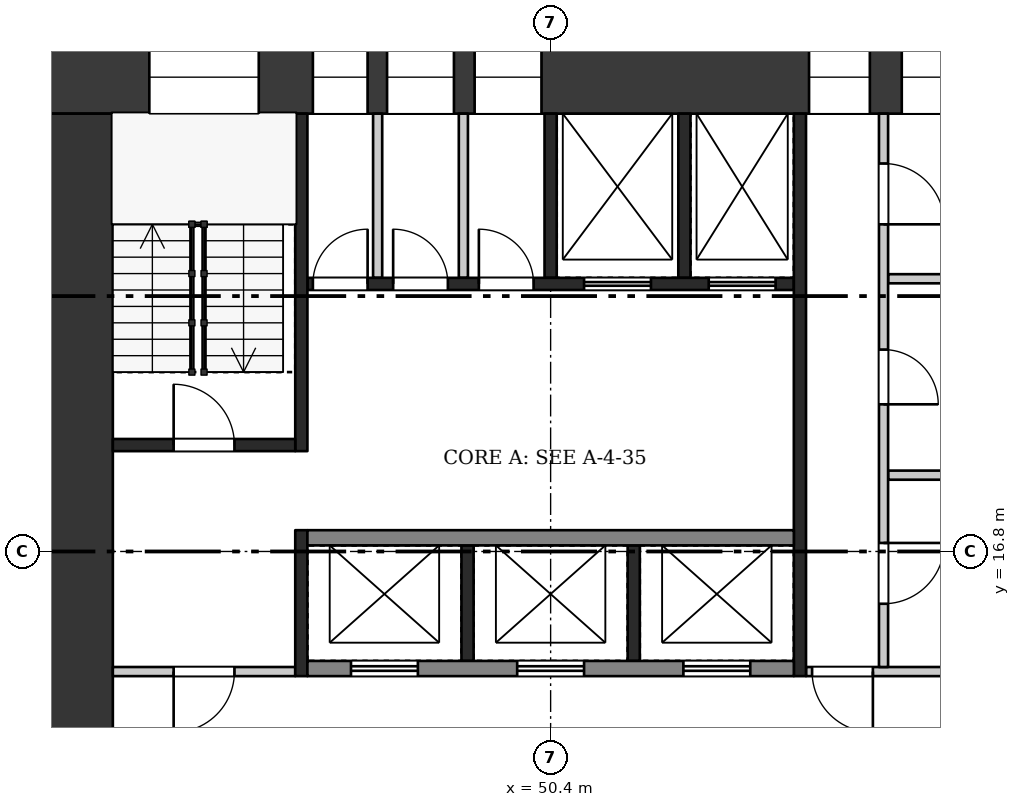
"""IFC4 building model, lengths in metres.
Left out: names, types, materials, properties, quantities, classifications, styles, units other than length and angle.
Written with IfcOpenShell. Run it as: python <this file> out.ifc"""

import sys

from ifc_helpers import new_model, si_unit, direction, frame, frame_2d, origin, place, context, subcontext, project, spatial, rectangle, extrude, element, fill, save


model = new_model("IFC4")
c1 = context("Model", 3, precision=1e-05, world=origin(), true_north=direction((0.0, 1.0)))
c2 = subcontext(c1, "Body", "Model", "MODEL_VIEW")
j1 = project(units=[si_unit("LENGTHUNIT", "METRE"), si_unit("PLANEANGLEUNIT", "RADIAN")], contexts=[c1])
p1 = place(None, origin())
s1 = spatial("IfcSite", under=j1, at=p1, CompositionType="ELEMENT")
p2 = place(p1, origin())
s2 = spatial("IfcBuilding", under=s1, at=p2, CompositionType="ELEMENT")
p3 = place(p2, frame((0.0, 0.0, 266.7)))
s3 = spatial("IfcBuildingStorey", under=s2, at=p3, CompositionType="ELEMENT", Elevation=266.7)
p4 = place(p3, frame((42.0, 24.6, 0.0), z_axis=(0.0, 0.0, 1.0), x_axis=(1.0, 0.0, 0.0)))
e1 = element("IfcWall", 1, at=p4, inside=s3, PredefinedType="SHEAR", context=c2, shape_type="SweptSolid", body=[
    extrude(rectangle(XDim=16.8, YDim=1.2, at=frame_2d((8.4, 0.0))), origin(), (0.0, 0.0, 1.0), 3.22),
])
p5 = place(p4, frame((1.8, 0.0, 0.5)))
e2 = element("IfcOpeningElement", 2, at=p5, cuts=e1, PredefinedType="OPENING", context=c2, shape_type="SweptSolid", body=[
    extrude(rectangle(XDim=1.8, YDim=2.4, at=frame_2d((0.9, 1.2))), frame((0.0, 0.61, 0.0), z_axis=(0.0, -1.0, 0.0), x_axis=(1.0, 0.0, 0.0)), (0.0, 0.0, 1.0), 1.22),
])
p6 = place(p4, frame((4.49, 0.0, 1.6)))
e3 = element("IfcOpeningElement", 3, at=p6, cuts=e1, PredefinedType="OPENING", context=c2, shape_type="SweptSolid", body=[
    extrude(rectangle(XDim=0.9, YDim=1.2, at=frame_2d((0.45, 0.6))), frame((0.0, 0.61, 0.0), z_axis=(0.0, -1.0, 0.0), x_axis=(1.0, 0.0, 0.0)), (0.0, 0.0, 1.0), 1.22),
])
p7 = place(p4, frame((5.71, 0.0, 1.6)))
e4 = element("IfcOpeningElement", 4, at=p7, cuts=e1, PredefinedType="OPENING", context=c2, shape_type="SweptSolid", body=[
    extrude(rectangle(XDim=1.1, YDim=1.2, at=frame_2d((0.55, 0.6))), frame((0.0, 0.61, 0.0), z_axis=(0.0, -1.0, 0.0), x_axis=(1.0, 0.0, 0.0)), (0.0, 0.0, 1.0), 1.22),
])
p8 = place(p4, frame((7.15, 0.0, 1.6)))
e5 = element("IfcOpeningElement", 5, at=p8, cuts=e1, PredefinedType="OPENING", context=c2, shape_type="SweptSolid", body=[
    extrude(rectangle(XDim=1.1, YDim=1.2, at=frame_2d((0.55, 0.6))), frame((0.0, 0.61, 0.0), z_axis=(0.0, -1.0, 0.0), x_axis=(1.0, 0.0, 0.0)), (0.0, 0.0, 1.0), 1.22),
])
p9 = place(p4, frame((12.65, 0.0, 0.6)))
e6 = element("IfcOpeningElement", 6, at=p9, cuts=e1, PredefinedType="OPENING", context=c2, shape_type="SweptSolid", body=[
    extrude(rectangle(XDim=1.0, YDim=2.1, at=frame_2d((0.5, 1.05))), frame((0.0, 0.61, 0.0), z_axis=(0.0, -1.0, 0.0), x_axis=(1.0, 0.0, 0.0)), (0.0, 0.0, 1.0), 1.22),
])
p10 = place(p4, frame((14.175, 0.0, 1.6)))
e7 = element("IfcOpeningElement", 7, at=p10, cuts=e1, PredefinedType="OPENING", context=c2, shape_type="SweptSolid", body=[
    extrude(rectangle(XDim=1.2, YDim=1.2, at=frame_2d((0.6, 0.6))), frame((0.0, 0.61, 0.0), z_axis=(0.0, -1.0, 0.0), x_axis=(1.0, 0.0, 0.0)), (0.0, 0.0, 1.0), 1.22),
])
p11 = place(p3, frame((42.6, 9.6, 0.0), z_axis=(0.0, 0.0, 1.0), x_axis=(0.0, 1.0, 0.0)))
e8 = element("IfcWall", 8, at=p11, inside=s3, PredefinedType="SHEAR", context=c2, shape_type="SweptSolid", body=[
    extrude(rectangle(XDim=14.4, YDim=1.2, at=frame_2d((7.2, 0.0))), origin(), (0.0, 0.0, 1.0), 3.22),
])
p12 = place(p11, frame((2.1, 0.0, 0.0)))
e9 = element("IfcOpeningElement", 9, at=p12, cuts=e8, PredefinedType="OPENING", context=c2, shape_type="SweptSolid", body=[
    extrude(rectangle(XDim=1.8, YDim=2.1, at=frame_2d((0.9, 1.05))), frame((0.0, 0.61, 0.0), z_axis=(0.0, -1.0, 0.0), x_axis=(1.0, 0.0, 0.0)), (0.0, 0.0, 1.0), 1.22),
])
for number, where, z_axis, x_axis in (
    (10, (49.033, 15.0, 0.0), (0.0, 0.0, 1.0), (0.0, 1.0, 0.0)),
    (11, (51.767, 15.0, 0.0), (0.0, 0.0, 1.0), (0.0, 1.0, 0.0)),
):
    element("IfcWall", number, at=place(p3, frame(where, z_axis=z_axis, x_axis=x_axis)), inside=s3, PredefinedType="SHEAR", context=c2, shape_type="SweptSolid", body=[
        extrude(rectangle(XDim=1.9, YDim=0.2, at=frame_2d((0.95, 0.0))), origin(), (0.0, 0.0, 1.0), 3.22),
    ])
p13 = place(p3, frame((46.4, 14.875, 0.0), z_axis=(0.0, 0.0, 1.0), x_axis=(1.0, 0.0, 0.0)))
e12 = element("IfcWall", 12, at=p13, inside=s3, PredefinedType="SHEAR", context=c2, shape_type="SweptSolid", body=[
    extrude(rectangle(XDim=8.0, YDim=0.25, at=frame_2d((4.0, 0.0))), origin(), (0.0, 0.0, 1.0), 3.22),
])
p14 = place(p13, frame((0.717, 0.0, 0.0)))
e13 = element("IfcOpeningElement", 13, at=p14, cuts=e12, PredefinedType="OPENING", context=c2, shape_type="SweptSolid", body=[
    extrude(rectangle(XDim=1.1, YDim=2.1, at=frame_2d((0.55, 1.05))), frame((0.0, 0.135, 0.0), z_axis=(0.0, -1.0, 0.0), x_axis=(1.0, 0.0, 0.0)), (0.0, 0.0, 1.0), 0.27),
])
p15 = place(p13, frame((3.45, 0.0, 0.0)))
e14 = element("IfcOpeningElement", 14, at=p15, cuts=e12, PredefinedType="OPENING", context=c2, shape_type="SweptSolid", body=[
    extrude(rectangle(XDim=1.1, YDim=2.1, at=frame_2d((0.55, 1.05))), frame((0.0, 0.135, 0.0), z_axis=(0.0, -1.0, 0.0), x_axis=(1.0, 0.0, 0.0)), (0.0, 0.0, 1.0), 0.27),
])
p16 = place(p13, frame((6.183, 0.0, 0.0)))
e15 = element("IfcOpeningElement", 15, at=p16, cuts=e12, PredefinedType="OPENING", context=c2, shape_type="SweptSolid", body=[
    extrude(rectangle(XDim=1.1, YDim=2.1, at=frame_2d((0.55, 1.05))), frame((0.0, 0.135, 0.0), z_axis=(0.0, -1.0, 0.0), x_axis=(1.0, 0.0, 0.0)), (0.0, 0.0, 1.0), 0.27),
])
p17 = place(p3, frame((46.4, 17.025, 0.0), z_axis=(0.0, 0.0, 1.0), x_axis=(1.0, 0.0, 0.0)))
e16 = element("IfcWall", 16, at=p17, inside=s3, PredefinedType="SHEAR", context=c2, shape_type="SweptSolid", body=[
    extrude(rectangle(XDim=8.0, YDim=0.25, at=frame_2d((4.0, 0.0))), origin(), (0.0, 0.0, 1.0), 3.22),
])
for number, where, z_axis, x_axis in (
    (17, (50.4, 21.3, 0.0), (0.0, 0.0, 1.0), (0.0, 1.0, 0.0)),
    (18, (52.6, 21.3, 0.0), (0.0, 0.0, 1.0), (0.0, 1.0, 0.0)),
):
    element("IfcWall", number, at=place(p3, frame(where, z_axis=z_axis, x_axis=x_axis)), inside=s3, PredefinedType="SHEAR", context=c2, shape_type="SweptSolid", body=[
        extrude(rectangle(XDim=2.7, YDim=0.2, at=frame_2d((1.35, 0.0))), origin(), (0.0, 0.0, 1.0), 3.22),
    ])
for number, where, z_axis, x_axis in (
    (19, (47.555, 21.3, 0.0), (0.0, 0.0, 1.0), (0.0, 1.0, 0.0)),
    (20, (48.965, 21.3, 0.0), (0.0, 0.0, 1.0), (0.0, 1.0, 0.0)),
):
    element("IfcWall", number, at=place(p3, frame(where, z_axis=z_axis, x_axis=x_axis)), inside=s3, PredefinedType="PARTITIONING", context=c2, shape_type="SweptSolid", body=[
        extrude(rectangle(XDim=2.7, YDim=0.15, at=frame_2d((1.35, 0.0))), origin(), (0.0, 0.0, 1.0), 3.22),
    ])
p18 = place(p3, frame((46.4, 21.2, 0.0), z_axis=(0.0, 0.0, 1.0), x_axis=(1.0, 0.0, 0.0)))
e21 = element("IfcWall", 21, at=p18, inside=s3, PredefinedType="SHEAR", context=c2, shape_type="SweptSolid", body=[
    extrude(rectangle(XDim=8.0, YDim=0.2, at=frame_2d((4.0, 0.0))), origin(), (0.0, 0.0, 1.0), 3.22),
])
p19 = place(p18, frame((0.09, 0.0, 0.0)))
e22 = element("IfcOpeningElement", 22, at=p19, cuts=e21, PredefinedType="OPENING", context=c2, shape_type="SweptSolid", body=[
    extrude(rectangle(XDim=0.9, YDim=2.1, at=frame_2d((0.45, 1.05))), frame((0.0, 0.11, 0.0), z_axis=(0.0, -1.0, 0.0), x_axis=(1.0, 0.0, 0.0)), (0.0, 0.0, 1.0), 0.22),
])
p20 = place(p18, frame((1.41, 0.0, 0.0)))
e23 = element("IfcOpeningElement", 23, at=p20, cuts=e21, PredefinedType="OPENING", context=c2, shape_type="SweptSolid", body=[
    extrude(rectangle(XDim=0.9, YDim=2.1, at=frame_2d((0.45, 1.05))), frame((0.0, 0.11, 0.0), z_axis=(0.0, -1.0, 0.0), x_axis=(1.0, 0.0, 0.0)), (0.0, 0.0, 1.0), 0.22),
])
p21 = place(p18, frame((2.82, 0.0, 0.0)))
e24 = element("IfcOpeningElement", 24, at=p21, cuts=e21, PredefinedType="OPENING", context=c2, shape_type="SweptSolid", body=[
    extrude(rectangle(XDim=0.9, YDim=2.1, at=frame_2d((0.45, 1.05))), frame((0.0, 0.11, 0.0), z_axis=(0.0, -1.0, 0.0), x_axis=(1.0, 0.0, 0.0)), (0.0, 0.0, 1.0), 0.22),
])
p22 = place(p18, frame((4.55, 0.0, 0.0)))
e25 = element("IfcOpeningElement", 25, at=p22, cuts=e21, PredefinedType="OPENING", context=c2, shape_type="SweptSolid", body=[
    extrude(rectangle(XDim=1.1, YDim=2.1, at=frame_2d((0.55, 1.05))), frame((0.0, 0.11, 0.0), z_axis=(0.0, -1.0, 0.0), x_axis=(1.0, 0.0, 0.0)), (0.0, 0.0, 1.0), 0.22),
])
p23 = place(p18, frame((6.6, 0.0, 0.0)))
e26 = element("IfcOpeningElement", 26, at=p23, cuts=e21, PredefinedType="OPENING", context=c2, shape_type="SweptSolid", body=[
    extrude(rectangle(XDim=1.1, YDim=2.1, at=frame_2d((0.55, 1.05))), frame((0.0, 0.11, 0.0), z_axis=(0.0, -1.0, 0.0), x_axis=(1.0, 0.0, 0.0)), (0.0, 0.0, 1.0), 0.22),
])
p24 = place(p3, frame((46.3, 14.75, 0.0), z_axis=(0.0, 0.0, 1.0), x_axis=(0.0, 1.0, 0.0)))
e27 = element("IfcWall", 27, at=p24, inside=s3, PredefinedType="SHEAR", context=c2, shape_type="SweptSolid", body=[
    extrude(rectangle(XDim=2.4, YDim=0.2, at=frame_2d((1.2, 0.0))), origin(), (0.0, 0.0, 1.0), 3.22),
])
p25 = place(p3, frame((46.3, 18.45, 0.0), z_axis=(0.0, 0.0, 1.0), x_axis=(0.0, 1.0, 0.0)))
e28 = element("IfcWall", 28, at=p25, inside=s3, PredefinedType="SHEAR", context=c2, shape_type="SweptSolid", body=[
    extrude(rectangle(XDim=5.55, YDim=0.2, at=frame_2d((2.775, 0.0))), origin(), (0.0, 0.0, 1.0), 3.22),
])
p26 = place(p3, frame((43.2, 14.825, 0.0), z_axis=(0.0, 0.0, 1.0), x_axis=(1.0, 0.0, 0.0)))
e29 = element("IfcWall", 29, at=p26, inside=s3, PredefinedType="PARTITIONING", context=c2, shape_type="SweptSolid", body=[
    extrude(rectangle(XDim=3.0, YDim=0.15, at=frame_2d((1.5, 0.0))), origin(), (0.0, 0.0, 1.0), 3.22),
])
p27 = place(p26, frame((1.0, 0.0, 0.0)))
e30 = element("IfcOpeningElement", 30, at=p27, cuts=e29, PredefinedType="OPENING", context=c2, shape_type="SweptSolid", body=[
    extrude(rectangle(XDim=1.0, YDim=2.1, at=frame_2d((0.5, 1.05))), frame((0.0, 0.085, 0.0), z_axis=(0.0, -1.0, 0.0), x_axis=(1.0, 0.0, 0.0)), (0.0, 0.0, 1.0), 0.17),
])
p28 = place(p3, frame((43.2, 18.55, 0.0), z_axis=(0.0, 0.0, 1.0), x_axis=(1.0, 0.0, 0.0)))
e31 = element("IfcWall", 31, at=p28, inside=s3, PredefinedType="SHEAR", context=c2, shape_type="SweptSolid", body=[
    extrude(rectangle(XDim=3.0, YDim=0.2, at=frame_2d((1.5, 0.0))), origin(), (0.0, 0.0, 1.0), 3.22),
])
p29 = place(p28, frame((1.0, 0.0, 0.0)))
e32 = element("IfcOpeningElement", 32, at=p29, cuts=e31, PredefinedType="OPENING", context=c2, shape_type="SweptSolid", body=[
    extrude(rectangle(XDim=1.0, YDim=2.1, at=frame_2d((0.5, 1.05))), frame((0.0, 0.11, 0.0), z_axis=(0.0, -1.0, 0.0), x_axis=(1.0, 0.0, 0.0)), (0.0, 0.0, 1.0), 0.22),
])
p30 = place(p3, frame((54.5, 14.75, 0.0), z_axis=(0.0, 0.0, 1.0), x_axis=(0.0, 1.0, 0.0)))
e33 = element("IfcWall", 33, at=p30, inside=s3, PredefinedType="SHEAR", context=c2, shape_type="SweptSolid", body=[
    extrude(rectangle(XDim=9.25, YDim=0.2, at=frame_2d((4.625, 0.0))), origin(), (0.0, 0.0, 1.0), 3.22),
])
p31 = place(p3, frame((54.6, 14.825, 0.0), z_axis=(0.0, 0.0, 1.0), x_axis=(1.0, 0.0, 0.0)))
e34 = element("IfcWall", 34, at=p31, inside=s3, PredefinedType="PARTITIONING", context=c2, shape_type="SweptSolid", body=[
    extrude(rectangle(XDim=3.0, YDim=0.15, at=frame_2d((1.5, 0.0))), origin(), (0.0, 0.0, 1.0), 3.22),
])
p32 = place(p31, frame((0.1, 0.0, 0.0)))
e35 = element("IfcOpeningElement", 35, at=p32, cuts=e34, PredefinedType="OPENING", context=c2, shape_type="SweptSolid", body=[
    extrude(rectangle(XDim=1.0, YDim=2.1, at=frame_2d((0.5, 1.05))), frame((0.0, 0.085, 0.0), z_axis=(0.0, -1.0, 0.0), x_axis=(1.0, 0.0, 0.0)), (0.0, 0.0, 1.0), 0.17),
])
for number, where, z_axis, x_axis in (
    (36, (55.95, 18.055, 0.0), (0.0, 0.0, 1.0), (1.0, 0.0, 0.0)),
    (37, (55.95, 21.285, 0.0), (0.0, 0.0, 1.0), (1.0, 0.0, 0.0)),
):
    element("IfcWall", number, at=place(p3, frame(where, z_axis=z_axis, x_axis=x_axis)), inside=s3, PredefinedType="PARTITIONING", context=c2, shape_type="SweptSolid", body=[
        extrude(rectangle(XDim=1.65, YDim=0.15, at=frame_2d((0.825, 0.0))), origin(), (0.0, 0.0, 1.0), 3.22),
    ])
p33 = place(p3, frame((55.875, 14.9, 0.0), z_axis=(0.0, 0.0, 1.0), x_axis=(0.0, 1.0, 0.0)))
e38 = element("IfcWall", 38, at=p33, inside=s3, PredefinedType="PARTITIONING", context=c2, shape_type="SweptSolid", body=[
    extrude(rectangle(XDim=9.1, YDim=0.15, at=frame_2d((4.55, 0.0))), origin(), (0.0, 0.0, 1.0), 3.22),
])
p34 = place(p33, frame((1.04, 0.0, 0.0)))
e39 = element("IfcOpeningElement", 39, at=p34, cuts=e38, PredefinedType="OPENING", context=c2, shape_type="SweptSolid", body=[
    extrude(rectangle(XDim=1.0, YDim=2.1, at=frame_2d((0.5, 1.05))), frame((0.0, 0.085, 0.0), z_axis=(0.0, -1.0, 0.0), x_axis=(1.0, 0.0, 0.0)), (0.0, 0.0, 1.0), 0.17),
])
p35 = place(p33, frame((4.32, 0.0, 0.0)))
e40 = element("IfcOpeningElement", 40, at=p35, cuts=e38, PredefinedType="OPENING", context=c2, shape_type="SweptSolid", body=[
    extrude(rectangle(XDim=0.9, YDim=2.1, at=frame_2d((0.45, 1.05))), frame((0.0, 0.085, 0.0), z_axis=(0.0, -1.0, 0.0), x_axis=(1.0, 0.0, 0.0)), (0.0, 0.0, 1.0), 0.17),
])
p36 = place(p33, frame((7.28, 0.0, 0.0)))
e41 = element("IfcOpeningElement", 41, at=p36, cuts=e38, PredefinedType="OPENING", context=c2, shape_type="SweptSolid", body=[
    extrude(rectangle(XDim=1.0, YDim=2.1, at=frame_2d((0.5, 1.05))), frame((0.0, 0.085, 0.0), z_axis=(0.0, -1.0, 0.0), x_axis=(1.0, 0.0, 0.0)), (0.0, 0.0, 1.0), 0.17),
])
p37 = place(p14, origin())
e42 = element("IfcDoor", 42, at=p37, inside=s3, OperationType="DOUBLE_DOOR_SLIDING", PredefinedType="DOOR", context=c2, shape_type="SweptSolid", body=[
    extrude(rectangle(XDim=1.1, YDim=2.1, at=frame_2d((0.55, 1.05))), frame((0.0, 0.025, 0.0), z_axis=(0.0, -1.0, 0.0), x_axis=(1.0, 0.0, 0.0)), (0.0, 0.0, 1.0), 0.05),
])
fill(e13, e42)
p38 = place(p15, origin())
e43 = element("IfcDoor", 43, at=p38, inside=s3, OperationType="DOUBLE_DOOR_SLIDING", PredefinedType="DOOR", context=c2, shape_type="SweptSolid", body=[
    extrude(rectangle(XDim=1.1, YDim=2.1, at=frame_2d((0.55, 1.05))), frame((0.0, 0.025, 0.0), z_axis=(0.0, -1.0, 0.0), x_axis=(1.0, 0.0, 0.0)), (0.0, 0.0, 1.0), 0.05),
])
fill(e14, e43)
p39 = place(p16, origin())
e44 = element("IfcDoor", 44, at=p39, inside=s3, OperationType="DOUBLE_DOOR_SLIDING", PredefinedType="DOOR", context=c2, shape_type="SweptSolid", body=[
    extrude(rectangle(XDim=1.1, YDim=2.1, at=frame_2d((0.55, 1.05))), frame((0.0, 0.025, 0.0), z_axis=(0.0, -1.0, 0.0), x_axis=(1.0, 0.0, 0.0)), (0.0, 0.0, 1.0), 0.05),
])
fill(e15, e44)
p40 = place(p19, origin())
e45 = element("IfcDoor", 45, at=p40, inside=s3, OperationType="SINGLE_SWING_RIGHT", PredefinedType="DOOR", context=c2, shape_type="SweptSolid", body=[
    extrude(rectangle(XDim=0.9, YDim=2.1, at=frame_2d((0.45, 1.05))), frame((0.0, 0.025, 0.0), z_axis=(0.0, -1.0, 0.0), x_axis=(1.0, 0.0, 0.0)), (0.0, 0.0, 1.0), 0.05),
])
fill(e22, e45)
p41 = place(p20, origin())
e46 = element("IfcDoor", 46, at=p41, inside=s3, OperationType="SINGLE_SWING_LEFT", PredefinedType="DOOR", context=c2, shape_type="SweptSolid", body=[
    extrude(rectangle(XDim=0.9, YDim=2.1, at=frame_2d((0.45, 1.05))), frame((0.0, 0.025, 0.0), z_axis=(0.0, -1.0, 0.0), x_axis=(1.0, 0.0, 0.0)), (0.0, 0.0, 1.0), 0.05),
])
fill(e23, e46)
p42 = place(p21, origin())
e47 = element("IfcDoor", 47, at=p42, inside=s3, OperationType="SINGLE_SWING_LEFT", PredefinedType="DOOR", context=c2, shape_type="SweptSolid", body=[
    extrude(rectangle(XDim=0.9, YDim=2.1, at=frame_2d((0.45, 1.05))), frame((0.0, 0.025, 0.0), z_axis=(0.0, -1.0, 0.0), x_axis=(1.0, 0.0, 0.0)), (0.0, 0.0, 1.0), 0.05),
])
fill(e24, e47)
p43 = place(p22, origin())
e48 = element("IfcDoor", 48, at=p43, inside=s3, OperationType="DOUBLE_DOOR_SLIDING", PredefinedType="DOOR", context=c2, shape_type="SweptSolid", body=[
    extrude(rectangle(XDim=1.1, YDim=2.1, at=frame_2d((0.55, 1.05))), frame((0.0, 0.025, 0.0), z_axis=(0.0, -1.0, 0.0), x_axis=(1.0, 0.0, 0.0)), (0.0, 0.0, 1.0), 0.05),
])
fill(e25, e48)
p44 = place(p23, origin())
e49 = element("IfcDoor", 49, at=p44, inside=s3, OperationType="DOUBLE_DOOR_SLIDING", PredefinedType="DOOR", context=c2, shape_type="SweptSolid", body=[
    extrude(rectangle(XDim=1.1, YDim=2.1, at=frame_2d((0.55, 1.05))), frame((0.0, 0.025, 0.0), z_axis=(0.0, -1.0, 0.0), x_axis=(1.0, 0.0, 0.0)), (0.0, 0.0, 1.0), 0.05),
])
fill(e26, e49)
p45 = place(p27, frame((1.0, 0.0, 0.0), z_axis=(0.0, 0.0, 1.0), x_axis=(-1.0, 0.0, 0.0)))
e50 = element("IfcDoor", 50, at=p45, inside=s3, OperationType="SINGLE_SWING_RIGHT", PredefinedType="DOOR", context=c2, shape_type="SweptSolid", body=[
    extrude(rectangle(XDim=1.0, YDim=2.1, at=frame_2d((0.5, 1.05))), frame((0.0, 0.025, 0.0), z_axis=(0.0, -1.0, 0.0), x_axis=(1.0, 0.0, 0.0)), (0.0, 0.0, 1.0), 0.05),
])
fill(e30, e50)
p46 = place(p29, origin())
e51 = element("IfcDoor", 51, at=p46, inside=s3, OperationType="SINGLE_SWING_LEFT", PredefinedType="DOOR", context=c2, shape_type="SweptSolid", body=[
    extrude(rectangle(XDim=1.0, YDim=2.1, at=frame_2d((0.5, 1.05))), frame((0.0, 0.025, 0.0), z_axis=(0.0, -1.0, 0.0), x_axis=(1.0, 0.0, 0.0)), (0.0, 0.0, 1.0), 0.05),
])
fill(e32, e51)
p47 = place(p32, frame((1.0, 0.0, 0.0), z_axis=(0.0, 0.0, 1.0), x_axis=(-1.0, 0.0, 0.0)))
e52 = element("IfcDoor", 52, at=p47, inside=s3, OperationType="SINGLE_SWING_LEFT", PredefinedType="DOOR", context=c2, shape_type="SweptSolid", body=[
    extrude(rectangle(XDim=1.0, YDim=2.1, at=frame_2d((0.5, 1.05))), frame((0.0, 0.025, 0.0), z_axis=(0.0, -1.0, 0.0), x_axis=(1.0, 0.0, 0.0)), (0.0, 0.0, 1.0), 0.05),
])
fill(e35, e52)
p48 = place(p34, frame((1.0, 0.0, 0.0), z_axis=(0.0, 0.0, 1.0), x_axis=(-1.0, 0.0, 0.0)))
e53 = element("IfcDoor", 53, at=p48, inside=s3, OperationType="SINGLE_SWING_LEFT", PredefinedType="DOOR", context=c2, shape_type="SweptSolid", body=[
    extrude(rectangle(XDim=1.0, YDim=2.1, at=frame_2d((0.5, 1.05))), frame((0.0, 0.025, 0.0), z_axis=(0.0, -1.0, 0.0), x_axis=(1.0, 0.0, 0.0)), (0.0, 0.0, 1.0), 0.05),
])
fill(e39, e53)
p49 = place(p35, frame((0.9, 0.0, 0.0), z_axis=(0.0, 0.0, 1.0), x_axis=(-1.0, 0.0, 0.0)))
e54 = element("IfcDoor", 54, at=p49, inside=s3, OperationType="SINGLE_SWING_RIGHT", PredefinedType="DOOR", context=c2, shape_type="SweptSolid", body=[
    extrude(rectangle(XDim=0.9, YDim=2.1, at=frame_2d((0.45, 1.05))), frame((0.0, 0.025, 0.0), z_axis=(0.0, -1.0, 0.0), x_axis=(1.0, 0.0, 0.0)), (0.0, 0.0, 1.0), 0.05),
])
fill(e40, e54)
p50 = place(p36, frame((1.0, 0.0, 0.0), z_axis=(0.0, 0.0, 1.0), x_axis=(-1.0, 0.0, 0.0)))
e55 = element("IfcDoor", 55, at=p50, inside=s3, OperationType="SINGLE_SWING_RIGHT", PredefinedType="DOOR", context=c2, shape_type="SweptSolid", body=[
    extrude(rectangle(XDim=1.0, YDim=2.1, at=frame_2d((0.5, 1.05))), frame((0.0, 0.025, 0.0), z_axis=(0.0, -1.0, 0.0), x_axis=(1.0, 0.0, 0.0)), (0.0, 0.0, 1.0), 0.05),
])
fill(e41, e55)
p51 = place(p5, origin())
e56 = element("IfcWindow", 56, at=p51, inside=s3, PartitioningType="SINGLE_PANEL", PredefinedType="WINDOW", context=c2, shape_type="SweptSolid", body=[
    extrude(rectangle(XDim=1.8, YDim=2.4, at=frame_2d((0.9, 1.2))), frame((0.0, 0.03, 0.0), z_axis=(0.0, -1.0, 0.0), x_axis=(1.0, 0.0, 0.0)), (0.0, 0.0, 1.0), 0.06),
])
fill(e2, e56)
p52 = place(p6, origin())
e57 = element("IfcWindow", 57, at=p52, inside=s3, PartitioningType="SINGLE_PANEL", PredefinedType="WINDOW", context=c2, shape_type="SweptSolid", body=[
    extrude(rectangle(XDim=0.9, YDim=1.2, at=frame_2d((0.45, 0.6))), frame((0.0, 0.03, 0.0), z_axis=(0.0, -1.0, 0.0), x_axis=(1.0, 0.0, 0.0)), (0.0, 0.0, 1.0), 0.06),
])
fill(e3, e57)
p53 = place(p7, origin())
e58 = element("IfcWindow", 58, at=p53, inside=s3, PartitioningType="SINGLE_PANEL", PredefinedType="WINDOW", context=c2, shape_type="SweptSolid", body=[
    extrude(rectangle(XDim=1.1, YDim=1.2, at=frame_2d((0.55, 0.6))), frame((0.0, 0.03, 0.0), z_axis=(0.0, -1.0, 0.0), x_axis=(1.0, 0.0, 0.0)), (0.0, 0.0, 1.0), 0.06),
])
fill(e4, e58)
p54 = place(p8, origin())
e59 = element("IfcWindow", 59, at=p54, inside=s3, PartitioningType="SINGLE_PANEL", PredefinedType="WINDOW", context=c2, shape_type="SweptSolid", body=[
    extrude(rectangle(XDim=1.1, YDim=1.2, at=frame_2d((0.55, 0.6))), frame((0.0, 0.03, 0.0), z_axis=(0.0, -1.0, 0.0), x_axis=(1.0, 0.0, 0.0)), (0.0, 0.0, 1.0), 0.06),
])
fill(e5, e59)
p55 = place(p9, origin())
e60 = element("IfcWindow", 60, at=p55, inside=s3, PartitioningType="SINGLE_PANEL", PredefinedType="WINDOW", context=c2, shape_type="SweptSolid", body=[
    extrude(rectangle(XDim=1.0, YDim=2.1, at=frame_2d((0.5, 1.05))), frame((0.0, 0.03, 0.0), z_axis=(0.0, -1.0, 0.0), x_axis=(1.0, 0.0, 0.0)), (0.0, 0.0, 1.0), 0.06),
])
fill(e6, e60)
p56 = place(p10, origin())
e61 = element("IfcWindow", 61, at=p56, inside=s3, PartitioningType="SINGLE_PANEL", PredefinedType="WINDOW", context=c2, shape_type="SweptSolid", body=[
    extrude(rectangle(XDim=1.2, YDim=1.2, at=frame_2d((0.6, 0.6))), frame((0.0, 0.03, 0.0), z_axis=(0.0, -1.0, 0.0), x_axis=(1.0, 0.0, 0.0)), (0.0, 0.0, 1.0), 0.06),
])
fill(e7, e61)
save(model, sys.argv[1])
